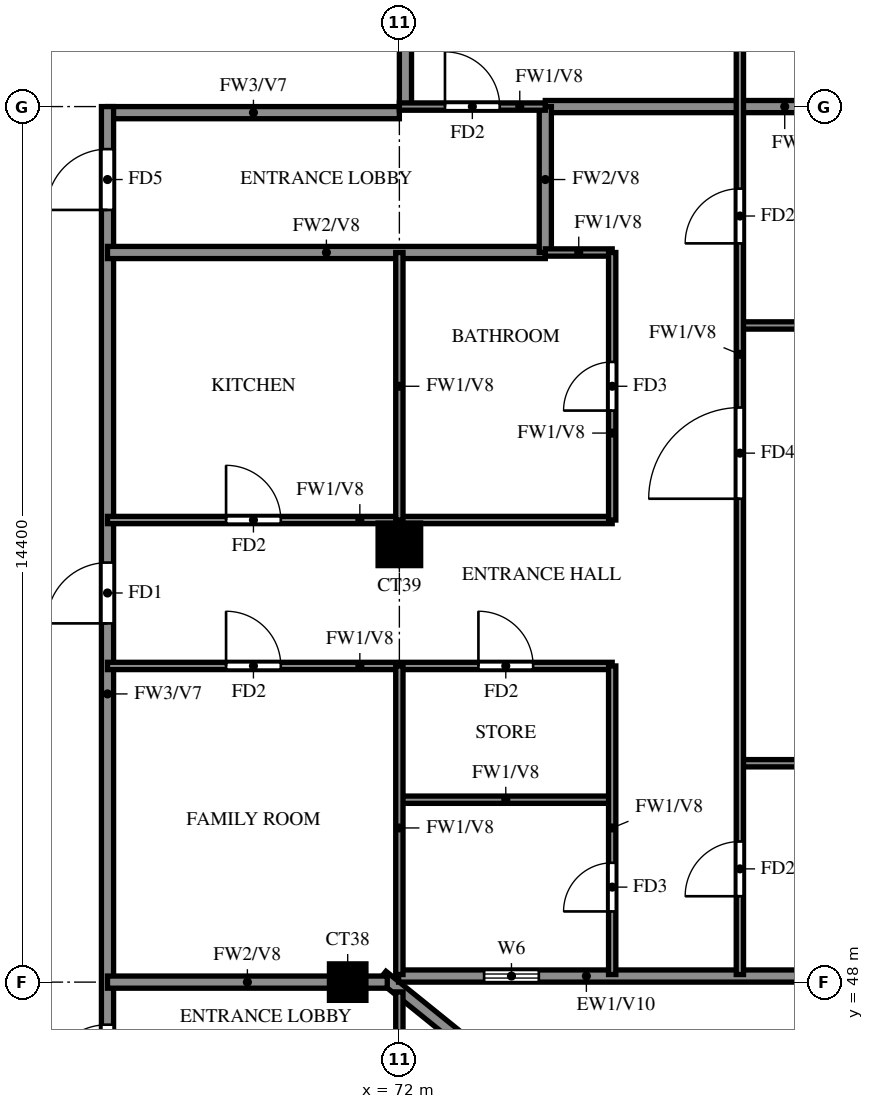
"""IFC4 building model, lengths in metres.
Left out: names, types, materials, properties, quantities, classifications, styles, units other than length and angle.
Written with IfcOpenShell. Run it as: python <this file> out.ifc"""

import sys

from ifc_helpers import new_model, si_unit, direction, frame, frame_2d, origin, origin_2d, place, context, subcontext, project, spatial, rectangle, extrude, source, transform, mapped, element, fill, save


model = new_model("IFC4")
c1 = context("Model", 3, precision=1e-05, world=origin(), true_north=direction((0.0, 1.0)))
c2 = subcontext(c1, "Body", "Model", "MODEL_VIEW")
j1 = project(units=[si_unit("LENGTHUNIT", "METRE"), si_unit("PLANEANGLEUNIT", "RADIAN")], contexts=[c1])
p1 = place(None, origin())
s1 = spatial("IfcSite", under=j1, at=p1, CompositionType="ELEMENT")
p2 = place(p1, origin())
s2 = spatial("IfcBuilding", under=s1, at=p2, CompositionType="ELEMENT")
p3 = place(p2, frame((0.0, 0.0, 267.5)))
s3 = spatial("IfcBuildingStorey", under=s2, at=p3, CompositionType="ELEMENT", Elevation=267.5)
m1 = source(origin(), c2, "Body", "SweptSolid", [
    extrude(rectangle(XDim=0.6, YDim=0.6, at=origin_2d()), origin(), (0.0, 0.0, 1.0), 3.099),
])
p4 = place(p3, frame((71.15, 48.0, 0.0), z_axis=(0.0, 0.0, 1.0), x_axis=(1.0, 0.0, 0.0)))
e1 = element("IfcColumn", 1, at=p4, inside=s3, PredefinedType="COLUMN", context=c2, shape_type="MappedRepresentation", body=[
    mapped(m1, transform((0.0, 0.0, 0.0))),
])
m2 = source(origin(), c2, "Body", "SweptSolid", [
    extrude(rectangle(XDim=0.7, YDim=0.7, at=origin_2d()), origin(), (0.0, 0.0, 1.0), 3.099),
])
p5 = place(p3, frame((72.0, 55.2, 0.0), z_axis=(0.0, 0.0, 1.0), x_axis=(1.0, 0.0, 0.0)))
e2 = element("IfcColumn", 2, at=p5, inside=s3, PredefinedType="COLUMN", context=c2, shape_type="MappedRepresentation", body=[
    mapped(m2, transform((0.0, 0.0, 0.0))),
])
p6 = place(p3, frame((81.907, 39.87, 0.0), z_axis=(0.0, 0.0, 1.0), x_axis=(-0.777936274417, 0.62834318087, 0.0)))
e3 = element("IfcWall", 3, at=p6, inside=s3, PredefinedType="SOLIDWALL", context=c2, shape_type="SweptSolid", body=[
    extrude(rectangle(XDim=13.099, YDim=0.2, at=frame_2d((6.549, 0.0))), origin(), (0.0, 0.0, 1.0), 3.099),
])
p7 = place(p6, frame((9.938, 0.0, 1.5)))
e4 = element("IfcOpeningElement", 4, at=p7, cuts=e3, PredefinedType="OPENING", context=c2, shape_type="SweptSolid", body=[
    extrude(rectangle(XDim=0.9, YDim=0.9, at=frame_2d((0.45, 0.45))), frame((0.0, 0.11, 0.0), z_axis=(0.0, -1.0, 0.0), x_axis=(1.0, 0.0, 0.0)), (0.0, 0.0, 1.0), 0.22),
])
p8 = place(p3, frame((71.987, 48.1, 0.0), z_axis=(0.0, 0.0, 1.0), x_axis=(1.0, 0.0, 0.0)))
e5 = element("IfcWall", 5, at=p8, inside=s3, PredefinedType="SOLIDWALL", context=c2, shape_type="SweptSolid", body=[
    extrude(rectangle(XDim=6.863, YDim=0.2, at=frame_2d((3.432, 0.0))), origin(), (0.0, 0.0, 1.0), 3.099),
])
p9 = place(p8, frame((1.406, 0.0, 1.5)))
e6 = element("IfcOpeningElement", 6, at=p9, cuts=e5, PredefinedType="OPENING", context=c2, shape_type="SweptSolid", body=[
    extrude(rectangle(XDim=0.9, YDim=0.9, at=frame_2d((0.45, 0.45))), frame((0.0, 0.11, 0.0), z_axis=(0.0, -1.0, 0.0), x_axis=(1.0, 0.0, 0.0)), (0.0, 0.0, 1.0), 0.22),
])
p10 = place(p3, frame((67.2, 62.3, 0.0), z_axis=(0.0, 0.0, 1.0), x_axis=(1.0, 0.0, 0.0)))
e7 = element("IfcWall", 7, at=p10, inside=s3, PredefinedType="SOLIDWALL", context=c2, shape_type="SweptSolid", body=[
    extrude(rectangle(XDim=4.8, YDim=0.2, at=frame_2d((2.4, 0.0))), origin(), (0.0, 0.0, 1.0), 3.099),
])
p11 = place(p3, frame((67.2, 45.6, 0.0), z_axis=(0.0, 0.0, 1.0), x_axis=(0.0, 1.0, 0.0)))
e8 = element("IfcWall", 8, at=p11, inside=s3, PredefinedType="SOLIDWALL", context=c2, shape_type="SweptSolid", body=[
    extrude(rectangle(XDim=16.8, YDim=0.2, at=frame_2d((8.4, 0.0))), origin(), (0.0, 0.0, 1.0), 3.099),
])
p12 = place(p11, frame((8.3, 0.0, 0.0)))
e9 = element("IfcOpeningElement", 9, at=p12, cuts=e8, PredefinedType="OPENING", context=c2, shape_type="SweptSolid", body=[
    extrude(rectangle(XDim=1.0, YDim=2.1, at=frame_2d((0.5, 1.05))), frame((0.0, 0.11, 0.0), z_axis=(0.0, -1.0, 0.0), x_axis=(1.0, 0.0, 0.0)), (0.0, 0.0, 1.0), 0.22),
])
p13 = place(p11, frame((15.1, 0.0, 0.0)))
e10 = element("IfcOpeningElement", 10, at=p13, cuts=e8, PredefinedType="OPENING", context=c2, shape_type="SweptSolid", body=[
    extrude(rectangle(XDim=1.0, YDim=2.1, at=frame_2d((0.5, 1.05))), frame((0.0, 0.11, 0.0), z_axis=(0.0, -1.0, 0.0), x_axis=(1.0, 0.0, 0.0)), (0.0, 0.0, 1.0), 0.22),
])
p14 = place(p11, frame((0.7, 0.0, 0.0)))
e11 = element("IfcOpeningElement", 11, at=p14, cuts=e8, PredefinedType="OPENING", context=c2, shape_type="SweptSolid", body=[
    extrude(rectangle(XDim=1.0, YDim=2.1, at=frame_2d((0.5, 1.05))), frame((0.0, 0.11, 0.0), z_axis=(0.0, -1.0, 0.0), x_axis=(1.0, 0.0, 0.0)), (0.0, 0.0, 1.0), 0.22),
])
p15 = place(p3, frame((72.1, 62.4, 0.0), z_axis=(0.0, 0.0, 1.0), x_axis=(0.0, 1.0, 0.0)))
e12 = element("IfcWall", 12, at=p15, inside=s3, PredefinedType="SOLIDWALL", context=c2, shape_type="SweptSolid", body=[
    extrude(rectangle(XDim=15.6, YDim=0.2, at=frame_2d((7.8, 0.0))), origin(), (0.0, 0.0, 1.0), 3.099),
])
p16 = place(p3, frame((67.2, 48.0, 0.0), z_axis=(0.0, 0.0, 1.0), x_axis=(1.0, 0.0, 0.0)))
e13 = element("IfcWall", 13, at=p16, inside=s3, PredefinedType="SOLIDWALL", context=c2, shape_type="SweptSolid", body=[
    extrude(rectangle(XDim=4.601, YDim=0.2, at=frame_2d((2.301, 0.0))), origin(), (0.0, 0.0, 1.0), 3.099),
])
p17 = place(p3, frame((67.2, 60.0, 0.0), z_axis=(0.0, 0.0, 1.0), x_axis=(1.0, 0.0, 0.0)))
e14 = element("IfcWall", 14, at=p17, inside=s3, PredefinedType="SOLIDWALL", context=c2, shape_type="SweptSolid", body=[
    extrude(rectangle(XDim=7.2, YDim=0.2, at=frame_2d((3.6, 0.0))), origin(), (0.0, 0.0, 1.0), 3.099),
])
p18 = place(p3, frame((74.4, 62.4, 0.0), z_axis=(0.0, 0.0, 1.0), x_axis=(1.0, 0.0, 0.0)))
e15 = element("IfcWall", 15, at=p18, inside=s3, PredefinedType="SOLIDWALL", context=c2, shape_type="SweptSolid", body=[
    extrude(rectangle(XDim=7.875, YDim=0.2, at=frame_2d((3.938, 0.0))), origin(), (0.0, 0.0, 1.0), 3.099),
])
p19 = place(p3, frame((74.4, 60.0, 0.0), z_axis=(0.0, 0.0, 1.0), x_axis=(0.0, 1.0, 0.0)))
e16 = element("IfcWall", 16, at=p19, inside=s3, PredefinedType="SOLIDWALL", context=c2, shape_type="SweptSolid", body=[
    extrude(rectangle(XDim=2.4, YDim=0.2, at=frame_2d((1.2, 0.0))), origin(), (0.0, 0.0, 1.0), 3.099),
])
p20 = place(p3, frame((72.0, 51.0, 0.0), z_axis=(0.0, 0.0, 1.0), x_axis=(1.0, 0.0, 0.0)))
e17 = element("IfcWall", 17, at=p20, inside=s3, PredefinedType="PARTITIONING", context=c2, shape_type="SweptSolid", body=[
    extrude(rectangle(XDim=3.5, YDim=0.12, at=frame_2d((1.75, 0.0))), origin(), (0.0, 0.0, 1.0), 3.099),
])
p21 = place(p3, frame((77.6, 51.6, 0.0), z_axis=(0.0, 0.0, 1.0), x_axis=(1.0, 0.0, 0.0)))
e18 = element("IfcWall", 18, at=p21, inside=s3, PredefinedType="PARTITIONING", context=c2, shape_type="SweptSolid", body=[
    extrude(rectangle(XDim=4.675, YDim=0.12, at=frame_2d((2.337, 0.0))), origin(), (0.0, 0.0, 1.0), 3.099),
])
p22 = place(p3, frame((67.2, 53.2, 0.0), z_axis=(0.0, 0.0, 1.0), x_axis=(1.0, 0.0, 0.0)))
e19 = element("IfcWall", 19, at=p22, inside=s3, PredefinedType="PARTITIONING", context=c2, shape_type="SweptSolid", body=[
    extrude(rectangle(XDim=8.3, YDim=0.12, at=frame_2d((4.15, 0.0))), origin(), (0.0, 0.0, 1.0), 3.099),
])
p23 = place(p22, frame((6.1, 0.0, 0.0)))
e20 = element("IfcOpeningElement", 20, at=p23, cuts=e19, PredefinedType="OPENING", context=c2, shape_type="SweptSolid", body=[
    extrude(rectangle(XDim=0.9, YDim=2.1, at=frame_2d((0.45, 1.05))), frame((0.0, 0.07, 0.0), z_axis=(0.0, -1.0, 0.0), x_axis=(1.0, 0.0, 0.0)), (0.0, 0.0, 1.0), 0.14),
])
p24 = place(p22, frame((1.95, 0.0, 0.0)))
e21 = element("IfcOpeningElement", 21, at=p24, cuts=e19, PredefinedType="OPENING", context=c2, shape_type="SweptSolid", body=[
    extrude(rectangle(XDim=0.9, YDim=2.1, at=frame_2d((0.45, 1.05))), frame((0.0, 0.07, 0.0), z_axis=(0.0, -1.0, 0.0), x_axis=(1.0, 0.0, 0.0)), (0.0, 0.0, 1.0), 0.14),
])
p25 = place(p3, frame((67.2, 55.6, 0.0), z_axis=(0.0, 0.0, 1.0), x_axis=(1.0, 0.0, 0.0)))
e22 = element("IfcWall", 22, at=p25, inside=s3, PredefinedType="PARTITIONING", context=c2, shape_type="SweptSolid", body=[
    extrude(rectangle(XDim=8.3, YDim=0.12, at=frame_2d((4.15, 0.0))), origin(), (0.0, 0.0, 1.0), 3.099),
])
p26 = place(p25, frame((1.95, 0.0, 0.0)))
e23 = element("IfcOpeningElement", 23, at=p26, cuts=e22, PredefinedType="OPENING", context=c2, shape_type="SweptSolid", body=[
    extrude(rectangle(XDim=0.9, YDim=2.1, at=frame_2d((0.45, 1.05))), frame((0.0, 0.07, 0.0), z_axis=(0.0, -1.0, 0.0), x_axis=(1.0, 0.0, 0.0)), (0.0, 0.0, 1.0), 0.14),
])
p27 = place(p3, frame((77.6, 58.8, 0.0), z_axis=(0.0, 0.0, 1.0), x_axis=(1.0, 0.0, 0.0)))
e24 = element("IfcWall", 24, at=p27, inside=s3, PredefinedType="PARTITIONING", context=c2, shape_type="SweptSolid", body=[
    extrude(rectangle(XDim=4.675, YDim=0.12, at=frame_2d((2.337, 0.0))), origin(), (0.0, 0.0, 1.0), 3.099),
])
p28 = place(p3, frame((74.4, 60.0, 0.0), z_axis=(0.0, 0.0, 1.0), x_axis=(1.0, 0.0, 0.0)))
e25 = element("IfcWall", 25, at=p28, inside=s3, PredefinedType="PARTITIONING", context=c2, shape_type="SweptSolid", body=[
    extrude(rectangle(XDim=1.1, YDim=0.12, at=frame_2d((0.55, 0.0))), origin(), (0.0, 0.0, 1.0), 3.099),
])
p29 = place(p3, frame((72.0, 62.4, 0.0), z_axis=(0.0, 0.0, 1.0), x_axis=(1.0, 0.0, 0.0)))
e26 = element("IfcWall", 26, at=p29, inside=s3, PredefinedType="PARTITIONING", context=c2, shape_type="SweptSolid", body=[
    extrude(rectangle(XDim=2.4, YDim=0.12, at=frame_2d((1.2, 0.0))), origin(), (0.0, 0.0, 1.0), 3.099),
])
p30 = place(p29, frame((0.75, 0.0, 0.0)))
e27 = element("IfcOpeningElement", 27, at=p30, cuts=e26, PredefinedType="OPENING", context=c2, shape_type="SweptSolid", body=[
    extrude(rectangle(XDim=0.9, YDim=2.1, at=frame_2d((0.45, 1.05))), frame((0.0, 0.07, 0.0), z_axis=(0.0, -1.0, 0.0), x_axis=(1.0, 0.0, 0.0)), (0.0, 0.0, 1.0), 0.14),
])
p31 = place(p3, frame((72.0, 39.725, 0.0), z_axis=(0.0, 0.0, 1.0), x_axis=(0.0, 1.0, 0.0)))
e28 = element("IfcWall", 28, at=p31, inside=s3, PredefinedType="PARTITIONING", context=c2, shape_type="SweptSolid", body=[
    extrude(rectangle(XDim=8.114, YDim=0.12, at=frame_2d((4.057, 0.0))), origin(), (0.0, 0.0, 1.0), 3.099),
])
p32 = place(p31, frame((1.788, 0.0, 0.0)))
e29 = element("IfcOpeningElement", 29, at=p32, cuts=e28, PredefinedType="OPENING", context=c2, shape_type="SweptSolid", body=[
    extrude(rectangle(XDim=1.5, YDim=2.1, at=frame_2d((0.75, 1.05))), frame((0.0, 0.07, 0.0), z_axis=(0.0, -1.0, 0.0), x_axis=(1.0, 0.0, 0.0)), (0.0, 0.0, 1.0), 0.14),
])
p33 = place(p31, frame((4.575, 0.0, 0.0)))
e30 = element("IfcOpeningElement", 30, at=p33, cuts=e28, PredefinedType="OPENING", context=c2, shape_type="SweptSolid", body=[
    extrude(rectangle(XDim=0.8, YDim=2.1, at=frame_2d((0.4, 1.05))), frame((0.0, 0.07, 0.0), z_axis=(0.0, -1.0, 0.0), x_axis=(1.0, 0.0, 0.0)), (0.0, 0.0, 1.0), 0.14),
])
p34 = place(p3, frame((72.0, 48.125, 0.0), z_axis=(0.0, 0.0, 1.0), x_axis=(0.0, 1.0, 0.0)))
e31 = element("IfcWall", 31, at=p34, inside=s3, PredefinedType="PARTITIONING", context=c2, shape_type="SweptSolid", body=[
    extrude(rectangle(XDim=5.075, YDim=0.12, at=frame_2d((2.538, 0.0))), origin(), (0.0, 0.0, 1.0), 3.099),
])
p35 = place(p3, frame((72.0, 55.6, 0.0), z_axis=(0.0, 0.0, 1.0), x_axis=(0.0, 1.0, 0.0)))
e32 = element("IfcWall", 32, at=p35, inside=s3, PredefinedType="PARTITIONING", context=c2, shape_type="SweptSolid", body=[
    extrude(rectangle(XDim=4.4, YDim=0.12, at=frame_2d((2.2, 0.0))), origin(), (0.0, 0.0, 1.0), 3.099),
])
p36 = place(p3, frame((75.5, 48.125, 0.0), z_axis=(0.0, 0.0, 1.0), x_axis=(0.0, 1.0, 0.0)))
e33 = element("IfcWall", 33, at=p36, inside=s3, PredefinedType="PARTITIONING", context=c2, shape_type="SweptSolid", body=[
    extrude(rectangle(XDim=5.075, YDim=0.12, at=frame_2d((2.538, 0.0))), origin(), (0.0, 0.0, 1.0), 3.099),
])
p37 = place(p36, frame((1.038, 0.0, 0.0)))
e34 = element("IfcOpeningElement", 34, at=p37, cuts=e33, PredefinedType="OPENING", context=c2, shape_type="SweptSolid", body=[
    extrude(rectangle(XDim=0.8, YDim=2.1, at=frame_2d((0.4, 1.05))), frame((0.0, 0.07, 0.0), z_axis=(0.0, -1.0, 0.0), x_axis=(1.0, 0.0, 0.0)), (0.0, 0.0, 1.0), 0.14),
])
p38 = place(p3, frame((75.5, 55.6, 0.0), z_axis=(0.0, 0.0, 1.0), x_axis=(0.0, 1.0, 0.0)))
e35 = element("IfcWall", 35, at=p38, inside=s3, PredefinedType="PARTITIONING", context=c2, shape_type="SweptSolid", body=[
    extrude(rectangle(XDim=4.4, YDim=0.12, at=frame_2d((2.2, 0.0))), origin(), (0.0, 0.0, 1.0), 3.099),
])
p39 = place(p38, frame((1.8, 0.0, 0.0)))
e36 = element("IfcOpeningElement", 36, at=p39, cuts=e35, PredefinedType="OPENING", context=c2, shape_type="SweptSolid", body=[
    extrude(rectangle(XDim=0.8, YDim=2.1, at=frame_2d((0.4, 1.05))), frame((0.0, 0.07, 0.0), z_axis=(0.0, -1.0, 0.0), x_axis=(1.0, 0.0, 0.0)), (0.0, 0.0, 1.0), 0.14),
])
p40 = place(p3, frame((77.6, 48.125, 0.0), z_axis=(0.0, 0.0, 1.0), x_axis=(0.0, 1.0, 0.0)))
e37 = element("IfcWall", 37, at=p40, inside=s3, PredefinedType="PARTITIONING", context=c2, shape_type="SweptSolid", body=[
    extrude(rectangle(XDim=21.475, YDim=0.12, at=frame_2d((10.738, 0.0))), origin(), (0.0, 0.0, 1.0), 3.099),
])
p41 = place(p40, frame((1.288, 0.0, 0.0)))
e38 = element("IfcOpeningElement", 38, at=p41, cuts=e37, PredefinedType="OPENING", context=c2, shape_type="SweptSolid", body=[
    extrude(rectangle(XDim=0.9, YDim=2.1, at=frame_2d((0.45, 1.05))), frame((0.0, 0.07, 0.0), z_axis=(0.0, -1.0, 0.0), x_axis=(1.0, 0.0, 0.0)), (0.0, 0.0, 1.0), 0.14),
])
p42 = place(p40, frame((7.825, 0.0, 0.0)))
e39 = element("IfcOpeningElement", 39, at=p42, cuts=e37, PredefinedType="OPENING", context=c2, shape_type="SweptSolid", body=[
    extrude(rectangle(XDim=1.5, YDim=2.1, at=frame_2d((0.75, 1.05))), frame((0.0, 0.07, 0.0), z_axis=(0.0, -1.0, 0.0), x_axis=(1.0, 0.0, 0.0)), (0.0, 0.0, 1.0), 0.14),
])
p43 = place(p40, frame((12.025, 0.0, 0.0)))
e40 = element("IfcOpeningElement", 40, at=p43, cuts=e37, PredefinedType="OPENING", context=c2, shape_type="SweptSolid", body=[
    extrude(rectangle(XDim=0.9, YDim=2.1, at=frame_2d((0.45, 1.05))), frame((0.0, 0.07, 0.0), z_axis=(0.0, -1.0, 0.0), x_axis=(1.0, 0.0, 0.0)), (0.0, 0.0, 1.0), 0.14),
])
p44 = place(p40, frame((15.625, 0.0, 0.0)))
e41 = element("IfcOpeningElement", 41, at=p44, cuts=e37, PredefinedType="OPENING", context=c2, shape_type="SweptSolid", body=[
    extrude(rectangle(XDim=0.9, YDim=2.1, at=frame_2d((0.45, 1.05))), frame((0.0, 0.07, 0.0), z_axis=(0.0, -1.0, 0.0), x_axis=(1.0, 0.0, 0.0)), (0.0, 0.0, 1.0), 0.14),
])
p45 = place(p40, frame((19.225, 0.0, 0.0)))
e42 = element("IfcOpeningElement", 42, at=p45, cuts=e37, PredefinedType="OPENING", context=c2, shape_type="SweptSolid", body=[
    extrude(rectangle(XDim=0.9, YDim=2.1, at=frame_2d((0.45, 1.05))), frame((0.0, 0.07, 0.0), z_axis=(0.0, -1.0, 0.0), x_axis=(1.0, 0.0, 0.0)), (0.0, 0.0, 1.0), 0.14),
])
p46 = place(p9, origin())
e43 = element("IfcWindow", 43, at=p46, inside=s3, PartitioningType="SINGLE_PANEL", PredefinedType="WINDOW", context=c2, shape_type="SweptSolid", body=[
    extrude(rectangle(XDim=0.9, YDim=0.9, at=frame_2d((0.45, 0.45))), frame((0.0, 0.03, 0.0), z_axis=(0.0, -1.0, 0.0), x_axis=(1.0, 0.0, 0.0)), (0.0, 0.0, 1.0), 0.06),
])
fill(e6, e43)
p47 = place(p12, origin())
e44 = element("IfcDoor", 44, at=p47, inside=s3, OperationType="SINGLE_SWING_RIGHT", PredefinedType="DOOR", context=c2, shape_type="SweptSolid", body=[
    extrude(rectangle(XDim=1.0, YDim=2.1, at=frame_2d((0.5, 1.05))), frame((0.0, 0.025, 0.0), z_axis=(0.0, -1.0, 0.0), x_axis=(1.0, 0.0, 0.0)), (0.0, 0.0, 1.0), 0.05),
])
fill(e9, e44)
p48 = place(p41, origin())
e45 = element("IfcDoor", 45, at=p48, inside=s3, OperationType="SINGLE_SWING_LEFT", PredefinedType="DOOR", context=c2, shape_type="SweptSolid", body=[
    extrude(rectangle(XDim=0.9, YDim=2.1, at=frame_2d((0.45, 1.05))), frame((0.0, 0.025, 0.0), z_axis=(0.0, -1.0, 0.0), x_axis=(1.0, 0.0, 0.0)), (0.0, 0.0, 1.0), 0.05),
])
fill(e38, e45)
p49 = place(p42, origin())
e46 = element("IfcDoor", 46, at=p49, inside=s3, OperationType="SINGLE_SWING_RIGHT", PredefinedType="DOOR", context=c2, shape_type="SweptSolid", body=[
    extrude(rectangle(XDim=1.5, YDim=2.1, at=frame_2d((0.75, 1.05))), frame((0.0, 0.025, 0.0), z_axis=(0.0, -1.0, 0.0), x_axis=(1.0, 0.0, 0.0)), (0.0, 0.0, 1.0), 0.05),
])
fill(e39, e46)
p50 = place(p43, origin())
e47 = element("IfcDoor", 47, at=p50, inside=s3, OperationType="SINGLE_SWING_RIGHT", PredefinedType="DOOR", context=c2, shape_type="SweptSolid", body=[
    extrude(rectangle(XDim=0.9, YDim=2.1, at=frame_2d((0.45, 1.05))), frame((0.0, 0.025, 0.0), z_axis=(0.0, -1.0, 0.0), x_axis=(1.0, 0.0, 0.0)), (0.0, 0.0, 1.0), 0.05),
])
fill(e40, e47)
p51 = place(p37, origin())
e48 = element("IfcDoor", 48, at=p51, inside=s3, OperationType="SINGLE_SWING_LEFT", PredefinedType="DOOR", context=c2, shape_type="SweptSolid", body=[
    extrude(rectangle(XDim=0.8, YDim=2.1, at=frame_2d((0.4, 1.05))), frame((0.0, 0.025, 0.0), z_axis=(0.0, -1.0, 0.0), x_axis=(1.0, 0.0, 0.0)), (0.0, 0.0, 1.0), 0.05),
])
fill(e34, e48)
p52 = place(p23, origin())
e49 = element("IfcDoor", 49, at=p52, inside=s3, OperationType="SINGLE_SWING_LEFT", PredefinedType="DOOR", context=c2, shape_type="SweptSolid", body=[
    extrude(rectangle(XDim=0.9, YDim=2.1, at=frame_2d((0.45, 1.05))), frame((0.0, 0.025, 0.0), z_axis=(0.0, -1.0, 0.0), x_axis=(1.0, 0.0, 0.0)), (0.0, 0.0, 1.0), 0.05),
])
fill(e20, e49)
p53 = place(p39, origin())
e50 = element("IfcDoor", 50, at=p53, inside=s3, OperationType="SINGLE_SWING_RIGHT", PredefinedType="DOOR", context=c2, shape_type="SweptSolid", body=[
    extrude(rectangle(XDim=0.8, YDim=2.1, at=frame_2d((0.4, 1.05))), frame((0.0, 0.025, 0.0), z_axis=(0.0, -1.0, 0.0), x_axis=(1.0, 0.0, 0.0)), (0.0, 0.0, 1.0), 0.05),
])
fill(e36, e50)
p54 = place(p24, origin())
e51 = element("IfcDoor", 51, at=p54, inside=s3, OperationType="SINGLE_SWING_LEFT", PredefinedType="DOOR", context=c2, shape_type="SweptSolid", body=[
    extrude(rectangle(XDim=0.9, YDim=2.1, at=frame_2d((0.45, 1.05))), frame((0.0, 0.025, 0.0), z_axis=(0.0, -1.0, 0.0), x_axis=(1.0, 0.0, 0.0)), (0.0, 0.0, 1.0), 0.05),
])
fill(e21, e51)
p55 = place(p26, origin())
e52 = element("IfcDoor", 52, at=p55, inside=s3, OperationType="SINGLE_SWING_LEFT", PredefinedType="DOOR", context=c2, shape_type="SweptSolid", body=[
    extrude(rectangle(XDim=0.9, YDim=2.1, at=frame_2d((0.45, 1.05))), frame((0.0, 0.025, 0.0), z_axis=(0.0, -1.0, 0.0), x_axis=(1.0, 0.0, 0.0)), (0.0, 0.0, 1.0), 0.05),
])
fill(e23, e52)
p56 = place(p30, origin())
e53 = element("IfcDoor", 53, at=p56, inside=s3, OperationType="SINGLE_SWING_LEFT", PredefinedType="DOOR", context=c2, shape_type="SweptSolid", body=[
    extrude(rectangle(XDim=0.9, YDim=2.1, at=frame_2d((0.45, 1.05))), frame((0.0, 0.025, 0.0), z_axis=(0.0, -1.0, 0.0), x_axis=(1.0, 0.0, 0.0)), (0.0, 0.0, 1.0), 0.05),
])
fill(e27, e53)
p57 = place(p13, origin())
e54 = element("IfcDoor", 54, at=p57, inside=s3, OperationType="SINGLE_SWING_RIGHT", PredefinedType="DOOR", context=c2, shape_type="SweptSolid", body=[
    extrude(rectangle(XDim=1.0, YDim=2.1, at=frame_2d((0.5, 1.05))), frame((0.0, 0.025, 0.0), z_axis=(0.0, -1.0, 0.0), x_axis=(1.0, 0.0, 0.0)), (0.0, 0.0, 1.0), 0.05),
])
fill(e10, e54)
p58 = place(p14, origin())
e55 = element("IfcDoor", 55, at=p58, inside=s3, OperationType="SINGLE_SWING_RIGHT", PredefinedType="DOOR", context=c2, shape_type="SweptSolid", body=[
    extrude(rectangle(XDim=1.0, YDim=2.1, at=frame_2d((0.5, 1.05))), frame((0.0, 0.025, 0.0), z_axis=(0.0, -1.0, 0.0), x_axis=(1.0, 0.0, 0.0)), (0.0, 0.0, 1.0), 0.05),
])
fill(e11, e55)
save(model, sys.argv[1])
